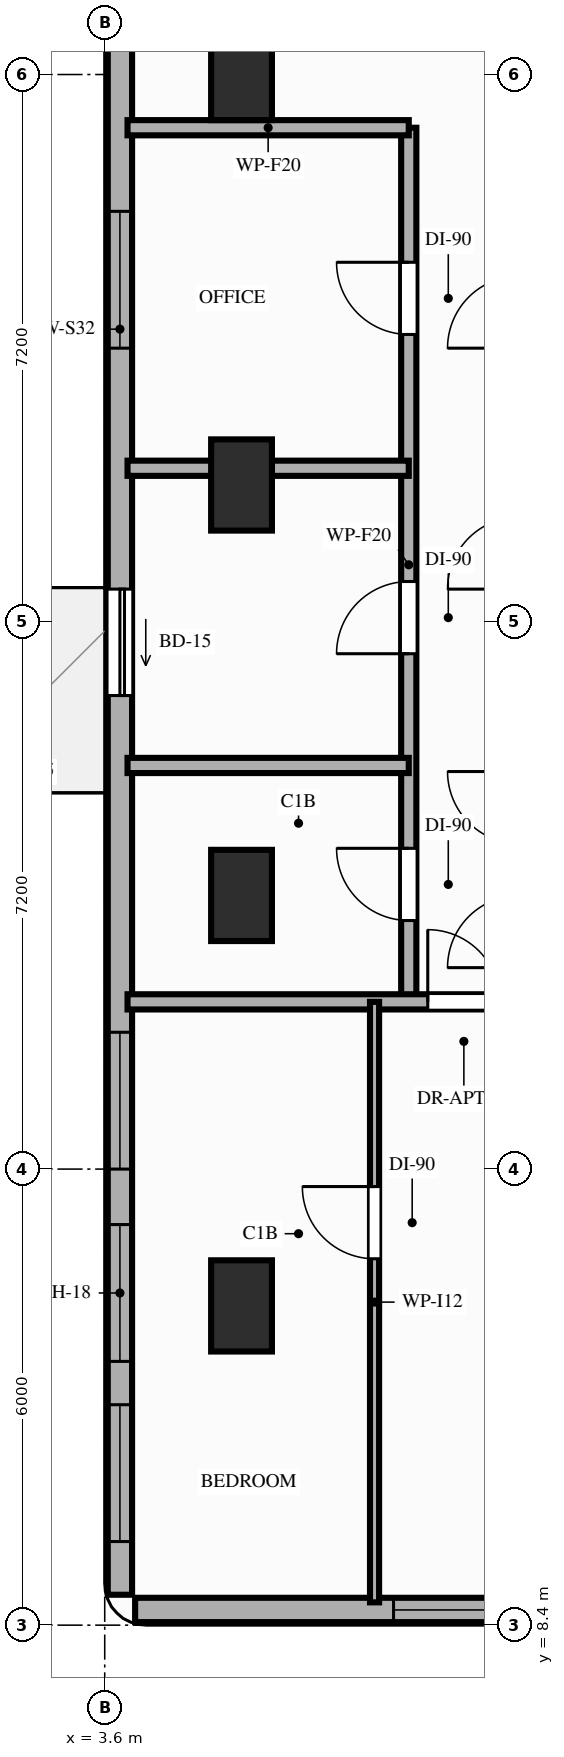
"""IFC4 building model, lengths in metres.
Left out: names, types, materials, properties, quantities, classifications, styles, units other than length and angle.
Written with IfcOpenShell. Run it as: python <this file> out.ifc"""

import sys

from ifc_helpers import new_model, si_unit, direction, frame, frame_2d, origin, origin_2d, place, context, subcontext, project, spatial, rectangle, extrude, element, fill, save


model = new_model("IFC4")
c1 = context("Model", 3, precision=1e-05, world=origin(), true_north=direction((0.0, 1.0)))
c2 = subcontext(c1, "Body", "Model", "MODEL_VIEW")
j1 = project(units=[si_unit("LENGTHUNIT", "METRE"), si_unit("PLANEANGLEUNIT", "RADIAN")], contexts=[c1])
p1 = place(None, origin())
s1 = spatial("IfcSite", under=j1, at=p1, CompositionType="ELEMENT")
p2 = place(p1, origin())
s2 = spatial("IfcBuilding", under=s1, at=p2, CompositionType="ELEMENT")
p3 = place(p2, frame((0.0, 0.0, 86.6)))
s3 = spatial("IfcBuildingStorey", under=s2, at=p3, CompositionType="ELEMENT", Elevation=86.6)
for number, where, z_axis, x_axis in (
    (1, (5.4, 12.6, 0.0), (0.0, 0.0, 1.0), (1.0, 0.0, 0.0)),
    (2, (5.4, 18.0, 0.0), (0.0, 0.0, 1.0), (1.0, 0.0, 0.0)),
    (3, (5.4, 23.4, 0.0), (0.0, 0.0, 1.0), (1.0, 0.0, 0.0)),
    (4, (5.4, 28.8, 0.0), (0.0, 0.0, 1.0), (1.0, 0.0, 0.0)),
):
    element("IfcColumn", number, at=place(p3, frame(where, z_axis=z_axis, x_axis=x_axis)), inside=s3, PredefinedType="COLUMN", context=c2, shape_type="SweptSolid", body=[
        extrude(rectangle(XDim=0.8, YDim=1.2, at=origin_2d()), origin(), (0.0, 0.0, 1.0), 3.2),
    ])
p4 = place(p3, frame((4.0, 8.6, 0.0), z_axis=(0.0, 0.0, 1.0), x_axis=(1.0, 0.0, 0.0)))
e5 = element("IfcWall", 5, at=p4, inside=s3, PredefinedType="STANDARD", context=c2, shape_type="SweptSolid", body=[
    extrude(rectangle(XDim=15.8, YDim=0.32, at=frame_2d((7.9, 0.0))), origin(), (0.0, 0.0, 1.0), 3.02),
])
p5 = place(p4, frame((6.57, 0.0, 0.85)))
e6 = element("IfcOpeningElement", 6, at=p5, cuts=e5, PredefinedType="OPENING", context=c2, shape_type="SweptSolid", body=[
    extrude(rectangle(XDim=1.8, YDim=1.75, at=frame_2d((0.9, 0.875))), frame((0.0, 0.17, 0.0), z_axis=(0.0, -1.0, 0.0), x_axis=(1.0, 0.0, 0.0)), (0.0, 0.0, 1.0), 0.34),
])
p6 = place(p4, frame((3.4, 0.0, 0.85)))
e7 = element("IfcOpeningElement", 7, at=p6, cuts=e5, PredefinedType="OPENING", context=c2, shape_type="SweptSolid", body=[
    extrude(rectangle(XDim=1.8, YDim=1.75, at=frame_2d((0.9, 0.875))), frame((0.0, 0.17, 0.0), z_axis=(0.0, -1.0, 0.0), x_axis=(1.0, 0.0, 0.0)), (0.0, 0.0, 1.0), 0.34),
])
p7 = place(p3, frame((3.8, 42.1, 0.0), z_axis=(0.0, 0.0, 1.0), x_axis=(0.0, -1.0, 0.0)))
e8 = element("IfcWall", 8, at=p7, inside=s3, PredefinedType="STANDARD", context=c2, shape_type="SweptSolid", body=[
    extrude(rectangle(XDim=33.3, YDim=0.32, at=frame_2d((16.65, 0.0))), origin(), (0.0, 0.0, 1.0), 2.7),
])
p8 = place(p7, frame((20.07, 0.0, 0.0)))
e9 = element("IfcOpeningElement", 9, at=p8, cuts=e8, PredefinedType="OPENING", context=c2, shape_type="SweptSolid", body=[
    extrude(rectangle(XDim=1.4, YDim=2.1, at=frame_2d((0.7, 1.05))), frame((0.0, 0.17, 0.0), z_axis=(0.0, -1.0, 0.0), x_axis=(1.0, 0.0, 0.0)), (0.0, 0.0, 1.0), 0.34),
])
p9 = place(p7, frame((28.43, 0.0, 0.85)))
e10 = element("IfcOpeningElement", 10, at=p9, cuts=e8, PredefinedType="OPENING", context=c2, shape_type="SweptSolid", body=[
    extrude(rectangle(XDim=1.8, YDim=1.6, at=frame_2d((0.9, 0.8))), frame((0.0, 0.17, 0.0), z_axis=(0.0, -1.0, 0.0), x_axis=(1.0, 0.0, 0.0)), (0.0, 0.0, 1.0), 0.34),
])
p10 = place(p7, frame((30.8, 0.0, 0.85)))
e11 = element("IfcOpeningElement", 11, at=p10, cuts=e8, PredefinedType="OPENING", context=c2, shape_type="SweptSolid", body=[
    extrude(rectangle(XDim=1.8, YDim=1.6, at=frame_2d((0.9, 0.8))), frame((0.0, 0.17, 0.0), z_axis=(0.0, -1.0, 0.0), x_axis=(1.0, 0.0, 0.0)), (0.0, 0.0, 1.0), 0.34),
])
p11 = place(p7, frame((25.9, 0.0, 0.85)))
e12 = element("IfcOpeningElement", 12, at=p11, cuts=e8, PredefinedType="OPENING", context=c2, shape_type="SweptSolid", body=[
    extrude(rectangle(XDim=1.8, YDim=1.6, at=frame_2d((0.9, 0.8))), frame((0.0, 0.17, 0.0), z_axis=(0.0, -1.0, 0.0), x_axis=(1.0, 0.0, 0.0)), (0.0, 0.0, 1.0), 0.34),
])
p12 = place(p7, frame((15.1, 0.0, 0.85)))
e13 = element("IfcOpeningElement", 13, at=p12, cuts=e8, PredefinedType="OPENING", context=c2, shape_type="SweptSolid", body=[
    extrude(rectangle(XDim=1.8, YDim=1.6, at=frame_2d((0.9, 0.8))), frame((0.0, 0.17, 0.0), z_axis=(0.0, -1.0, 0.0), x_axis=(1.0, 0.0, 0.0)), (0.0, 0.0, 1.0), 0.34),
])
p13 = place(p7, frame((9.9, 0.0, 0.85)))
e14 = element("IfcOpeningElement", 14, at=p13, cuts=e8, PredefinedType="OPENING", context=c2, shape_type="SweptSolid", body=[
    extrude(rectangle(XDim=1.8, YDim=1.6, at=frame_2d((0.9, 0.8))), frame((0.0, 0.17, 0.0), z_axis=(0.0, -1.0, 0.0), x_axis=(1.0, 0.0, 0.0)), (0.0, 0.0, 1.0), 0.34),
])
p14 = place(p7, frame((3.8, 0.0, 0.85)))
e15 = element("IfcOpeningElement", 15, at=p14, cuts=e8, PredefinedType="OPENING", context=c2, shape_type="SweptSolid", body=[
    extrude(rectangle(XDim=1.8, YDim=1.6, at=frame_2d((0.9, 0.8))), frame((0.0, 0.17, 0.0), z_axis=(0.0, -1.0, 0.0), x_axis=(1.0, 0.0, 0.0)), (0.0, 0.0, 1.0), 0.34),
])
p15 = place(p3, frame((7.6, 16.6, 0.0), z_axis=(0.0, 0.0, 1.0), x_axis=(0.0, 1.0, 0.0)))
e16 = element("IfcWall", 16, at=p15, inside=s3, PredefinedType="PARTITIONING", context=c2, shape_type="SweptSolid", body=[
    extrude(rectangle(XDim=11.5, YDim=0.2, at=frame_2d((5.75, 0.0))), origin(), (0.0, 0.0, 1.0), 2.4),
])
p16 = place(p15, frame((1.07, 0.0, 0.0)))
e17 = element("IfcOpeningElement", 17, at=p16, cuts=e16, PredefinedType="OPENING", context=c2, shape_type="SweptSolid", body=[
    extrude(rectangle(XDim=0.95, YDim=2.15, at=frame_2d((0.475, 1.075))), frame((0.0, 0.11, 0.0), z_axis=(0.0, -1.0, 0.0), x_axis=(1.0, 0.0, 0.0)), (0.0, 0.0, 1.0), 0.22),
])
p17 = place(p15, frame((4.58, 0.0, 0.0)))
e18 = element("IfcOpeningElement", 18, at=p17, cuts=e16, PredefinedType="OPENING", context=c2, shape_type="SweptSolid", body=[
    extrude(rectangle(XDim=0.95, YDim=2.15, at=frame_2d((0.475, 1.075))), frame((0.0, 0.11, 0.0), z_axis=(0.0, -1.0, 0.0), x_axis=(1.0, 0.0, 0.0)), (0.0, 0.0, 1.0), 0.22),
])
p18 = place(p15, frame((8.78, 0.0, 0.0)))
e19 = element("IfcOpeningElement", 19, at=p18, cuts=e16, PredefinedType="OPENING", context=c2, shape_type="SweptSolid", body=[
    extrude(rectangle(XDim=0.95, YDim=2.15, at=frame_2d((0.475, 1.075))), frame((0.0, 0.11, 0.0), z_axis=(0.0, -1.0, 0.0), x_axis=(1.0, 0.0, 0.0)), (0.0, 0.0, 1.0), 0.22),
])
p19 = place(p3, frame((3.9, 16.6, 0.0), z_axis=(0.0, 0.0, 1.0), x_axis=(1.0, 0.0, 0.0)))
e20 = element("IfcWall", 20, at=p19, inside=s3, PredefinedType="PARTITIONING", context=c2, shape_type="SweptSolid", body=[
    extrude(rectangle(XDim=16.0, YDim=0.2, at=frame_2d((8.0, 0.0))), origin(), (0.0, 0.0, 1.0), 2.4),
])
p20 = place(p19, frame((3.95, 0.0, 0.0)))
e21 = element("IfcOpeningElement", 21, at=p20, cuts=e20, PredefinedType="OPENING", context=c2, shape_type="SweptSolid", body=[
    extrude(rectangle(XDim=0.95, YDim=2.15, at=frame_2d((0.475, 1.075))), frame((0.0, 0.11, 0.0), z_axis=(0.0, -1.0, 0.0), x_axis=(1.0, 0.0, 0.0)), (0.0, 0.0, 1.0), 0.22),
])
for number, where, z_axis, x_axis in (
    (22, (3.9, 28.1, 0.0), (0.0, 0.0, 1.0), (1.0, 0.0, 0.0)),
    (23, (3.9, 19.71, 0.0), (0.0, 0.0, 1.0), (1.0, 0.0, 0.0)),
    (24, (3.9, 23.62, 0.0), (0.0, 0.0, 1.0), (1.0, 0.0, 0.0)),
):
    element("IfcWall", number, at=place(p3, frame(where, z_axis=z_axis, x_axis=x_axis)), inside=s3, PredefinedType="PARTITIONING", context=c2, shape_type="SweptSolid", body=[
        extrude(rectangle(XDim=3.7, YDim=0.2, at=frame_2d((1.85, 0.0))), origin(), (0.0, 0.0, 1.0), 2.4),
    ])
p21 = place(p3, frame((7.15, 8.7, 0.0), z_axis=(0.0, 0.0, 1.0), x_axis=(0.0, 1.0, 0.0)))
e25 = element("IfcWall", 25, at=p21, inside=s3, PredefinedType="PARTITIONING", context=c2, shape_type="SweptSolid", body=[
    extrude(rectangle(XDim=7.9, YDim=0.12, at=frame_2d((3.95, 0.0))), origin(), (0.0, 0.0, 1.0), 2.4),
])
p22 = place(p21, frame((4.52, 0.0, 0.0)))
e26 = element("IfcOpeningElement", 26, at=p22, cuts=e25, PredefinedType="OPENING", context=c2, shape_type="SweptSolid", body=[
    extrude(rectangle(XDim=0.95, YDim=2.15, at=frame_2d((0.475, 1.075))), frame((0.0, 0.07, 0.0), z_axis=(0.0, -1.0, 0.0), x_axis=(1.0, 0.0, 0.0)), (0.0, 0.0, 1.0), 0.14),
])
p23 = place(p8, origin())
e27 = element("IfcDoor", 27, at=p23, inside=s3, OperationType="SLIDING_TO_RIGHT", PredefinedType="DOOR", context=c2, shape_type="SweptSolid", body=[
    extrude(rectangle(XDim=1.4, YDim=2.1, at=frame_2d((0.7, 1.05))), frame((0.0, 0.025, 0.0), z_axis=(0.0, -1.0, 0.0), x_axis=(1.0, 0.0, 0.0)), (0.0, 0.0, 1.0), 0.05),
])
fill(e9, e27)
p24 = place(p9, origin())
e28 = element("IfcWindow", 28, at=p24, inside=s3, PartitioningType="SINGLE_PANEL", PredefinedType="WINDOW", context=c2, shape_type="SweptSolid", body=[
    extrude(rectangle(XDim=1.8, YDim=1.6, at=frame_2d((0.9, 0.8))), frame((0.0, 0.03, 0.0), z_axis=(0.0, -1.0, 0.0), x_axis=(1.0, 0.0, 0.0)), (0.0, 0.0, 1.0), 0.06),
])
fill(e10, e28)
p25 = place(p10, origin())
e29 = element("IfcWindow", 29, at=p25, inside=s3, PartitioningType="SINGLE_PANEL", PredefinedType="WINDOW", context=c2, shape_type="SweptSolid", body=[
    extrude(rectangle(XDim=1.8, YDim=1.6, at=frame_2d((0.9, 0.8))), frame((0.0, 0.03, 0.0), z_axis=(0.0, -1.0, 0.0), x_axis=(1.0, 0.0, 0.0)), (0.0, 0.0, 1.0), 0.06),
])
fill(e11, e29)
p26 = place(p11, origin())
e30 = element("IfcWindow", 30, at=p26, inside=s3, PartitioningType="SINGLE_PANEL", PredefinedType="WINDOW", context=c2, shape_type="SweptSolid", body=[
    extrude(rectangle(XDim=1.8, YDim=1.6, at=frame_2d((0.9, 0.8))), frame((0.0, 0.03, 0.0), z_axis=(0.0, -1.0, 0.0), x_axis=(1.0, 0.0, 0.0)), (0.0, 0.0, 1.0), 0.06),
])
fill(e12, e30)
p27 = place(p12, origin())
e31 = element("IfcWindow", 31, at=p27, inside=s3, PartitioningType="SINGLE_PANEL", PredefinedType="WINDOW", context=c2, shape_type="SweptSolid", body=[
    extrude(rectangle(XDim=1.8, YDim=1.6, at=frame_2d((0.9, 0.8))), frame((0.0, 0.03, 0.0), z_axis=(0.0, -1.0, 0.0), x_axis=(1.0, 0.0, 0.0)), (0.0, 0.0, 1.0), 0.06),
])
fill(e13, e31)
p28 = place(p6, origin())
e32 = element("IfcWindow", 32, at=p28, inside=s3, PartitioningType="SINGLE_PANEL", PredefinedType="WINDOW", context=c2, shape_type="SweptSolid", body=[
    extrude(rectangle(XDim=1.8, YDim=1.75, at=frame_2d((0.9, 0.875))), frame((0.0, 0.03, 0.0), z_axis=(0.0, -1.0, 0.0), x_axis=(1.0, 0.0, 0.0)), (0.0, 0.0, 1.0), 0.06),
])
fill(e7, e32)
p29 = place(p16, origin())
e33 = element("IfcDoor", 33, at=p29, inside=s3, OperationType="SINGLE_SWING_RIGHT", PredefinedType="DOOR", context=c2, shape_type="SweptSolid", body=[
    extrude(rectangle(XDim=0.95, YDim=2.15, at=frame_2d((0.475, 1.075))), frame((0.0, 0.025, 0.0), z_axis=(0.0, -1.0, 0.0), x_axis=(1.0, 0.0, 0.0)), (0.0, 0.0, 1.0), 0.05),
])
fill(e17, e33)
p30 = place(p17, origin())
e34 = element("IfcDoor", 34, at=p30, inside=s3, OperationType="SINGLE_SWING_LEFT", PredefinedType="DOOR", context=c2, shape_type="SweptSolid", body=[
    extrude(rectangle(XDim=0.95, YDim=2.15, at=frame_2d((0.475, 1.075))), frame((0.0, 0.025, 0.0), z_axis=(0.0, -1.0, 0.0), x_axis=(1.0, 0.0, 0.0)), (0.0, 0.0, 1.0), 0.05),
])
fill(e18, e34)
p31 = place(p18, origin())
e35 = element("IfcDoor", 35, at=p31, inside=s3, OperationType="SINGLE_SWING_RIGHT", PredefinedType="DOOR", context=c2, shape_type="SweptSolid", body=[
    extrude(rectangle(XDim=0.95, YDim=2.15, at=frame_2d((0.475, 1.075))), frame((0.0, 0.025, 0.0), z_axis=(0.0, -1.0, 0.0), x_axis=(1.0, 0.0, 0.0)), (0.0, 0.0, 1.0), 0.05),
])
fill(e19, e35)
p32 = place(p20, origin())
e36 = element("IfcDoor", 36, at=p32, inside=s3, OperationType="SINGLE_SWING_LEFT", PredefinedType="DOOR", context=c2, shape_type="SweptSolid", body=[
    extrude(rectangle(XDim=0.95, YDim=2.15, at=frame_2d((0.475, 1.075))), frame((0.0, 0.025, 0.0), z_axis=(0.0, -1.0, 0.0), x_axis=(1.0, 0.0, 0.0)), (0.0, 0.0, 1.0), 0.05),
])
fill(e21, e36)
p33 = place(p22, origin())
e37 = element("IfcDoor", 37, at=p33, inside=s3, OperationType="SINGLE_SWING_RIGHT", PredefinedType="DOOR", context=c2, shape_type="SweptSolid", body=[
    extrude(rectangle(XDim=0.95, YDim=2.15, at=frame_2d((0.475, 1.075))), frame((0.0, 0.025, 0.0), z_axis=(0.0, -1.0, 0.0), x_axis=(1.0, 0.0, 0.0)), (0.0, 0.0, 1.0), 0.05),
])
fill(e26, e37)
save(model, sys.argv[1])
